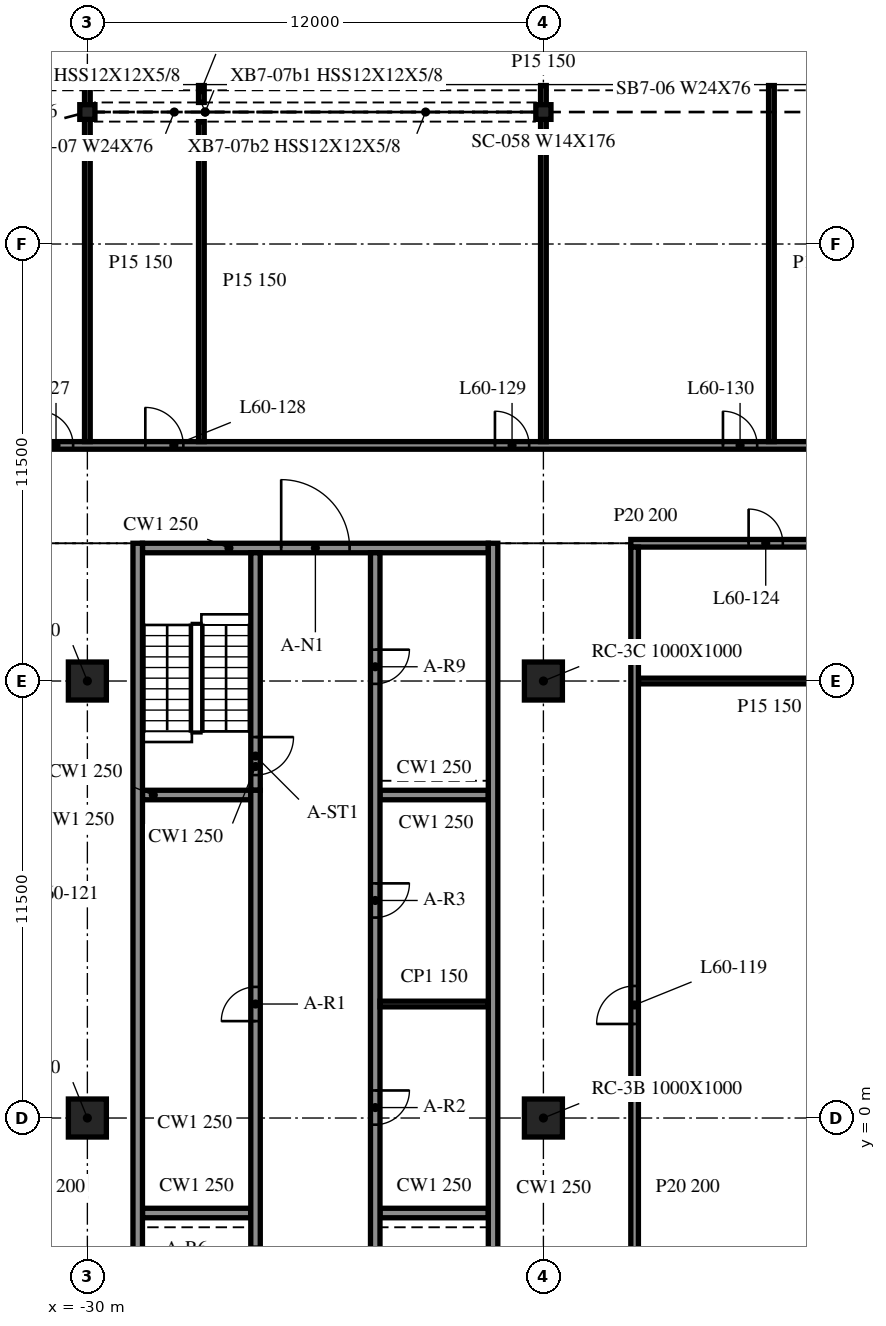
"""IFC4 building model, lengths in metres.
Left out: names, types, materials, properties, quantities, classifications, styles, units other than length and angle.
Written with IfcOpenShell. Run it as: python <this file> out.ifc"""

import sys

from ifc_helpers import new_model, si_unit, direction, frame, frame_2d, origin, origin_2d, place, context, subcontext, project, spatial, rectangle, i_section, extrude, element, fill, save


model = new_model("IFC4")
c1 = context("Model", 3, precision=1e-05, world=origin(), true_north=direction((0.0, 1.0)))
c2 = subcontext(c1, "Body", "Model", "MODEL_VIEW")
j1 = project(units=[si_unit("LENGTHUNIT", "METRE"), si_unit("PLANEANGLEUNIT", "RADIAN")], contexts=[c1])
p1 = place(None, origin())
s1 = spatial("IfcSite", under=j1, at=p1, CompositionType="ELEMENT")
p2 = place(p1, origin())
s2 = spatial("IfcBuilding", under=s1, at=p2, CompositionType="ELEMENT")
p3 = place(p2, frame((0.0, 0.0, 247.6)))
s3 = spatial("IfcBuildingStorey", under=s2, at=p3, CompositionType="ELEMENT", Elevation=247.6)
for number, where, z_axis, x_axis in (
    (1, (-30.0, 0.0, -0.34), (0.0, 0.0, 1.0), (1.0, 0.0, 0.0)),
    (2, (-30.0, 11.5, -0.34), (0.0, 0.0, 1.0), (1.0, 0.0, 0.0)),
    (3, (-18.0, 0.0, -0.34), (0.0, 0.0, 1.0), (1.0, 0.0, 0.0)),
    (4, (-18.0, 11.5, -0.34), (0.0, 0.0, 1.0), (1.0, 0.0, 0.0)),
):
    element("IfcColumn", number, at=place(p3, frame(where, z_axis=z_axis, x_axis=x_axis)), inside=s3, PredefinedType="COLUMN", context=c2, shape_type="SweptSolid", body=[
        extrude(rectangle(XDim=1.0, YDim=1.0, at=origin_2d()), origin(), (0.0, 0.0, 1.0), 3.8),
    ])
for number, where, z_axis, x_axis in (
    (5, (-18.0, 26.473, -0.34), (0.0, 0.0, 1.0), (1.0, 0.0, 0.0)),
    (6, (-30.0, 26.473, -0.34), (0.0, 0.0, 1.0), (1.0, 0.0, 0.0)),
):
    element("IfcColumn", number, at=place(p3, frame(where, z_axis=z_axis, x_axis=x_axis)), inside=s3, PredefinedType="COLUMN", context=c2, shape_type="SweptSolid", body=[
        extrude(i_section(OverallWidth=0.399, OverallDepth=0.386, WebThickness=0.021, FlangeThickness=0.033, at=origin_2d()), origin(), (0.0, 0.0, 1.0), 3.8),
    ])
for number, where, z_axis, x_axis in (
    (7, (-28.675, 15.125, 0.0), (0.0, 0.0, 1.0), (0.0, -1.0, 0.0)),
    (8, (-19.325, -9.125, 0.0), (0.0, 0.0, 1.0), (0.0, 1.0, 0.0)),
):
    element("IfcWall", number, at=place(p3, frame(where, z_axis=z_axis, x_axis=x_axis)), inside=s3, PredefinedType="SOLIDWALL", context=c2, shape_type="SweptSolid", body=[
        extrude(rectangle(XDim=24.25, YDim=0.25, at=frame_2d((12.125, 0.0))), origin(), (0.0, 0.0, 1.0), 3.46),
    ])
p4 = place(p3, frame((-28.55, 15.0, 0.0), z_axis=(0.0, 0.0, 1.0), x_axis=(1.0, 0.0, 0.0)))
e9 = element("IfcWall", 9, at=p4, inside=s3, PredefinedType="SOLIDWALL", context=c2, shape_type="SweptSolid", body=[
    extrude(rectangle(XDim=9.1, YDim=0.25, at=frame_2d((4.55, 0.0))), origin(), (0.0, 0.0, 1.0), 3.46),
])
p5 = place(p4, frame((3.65, 0.0, 0.0)))
e10 = element("IfcOpeningElement", 10, at=p5, cuts=e9, PredefinedType="OPENING", context=c2, shape_type="SweptSolid", body=[
    extrude(rectangle(XDim=1.8, YDim=2.1, at=frame_2d((0.9, 1.05))), frame((0.0, 0.135, 0.0), z_axis=(0.0, -1.0, 0.0), x_axis=(1.0, 0.0, 0.0)), (0.0, 0.0, 1.0), 0.27),
])
p6 = place(p3, frame((-25.575, -8.875, 0.0), z_axis=(0.0, 0.0, 1.0), x_axis=(0.0, 1.0, 0.0)))
e11 = element("IfcWall", 11, at=p6, inside=s3, PredefinedType="SOLIDWALL", context=c2, shape_type="SweptSolid", body=[
    extrude(rectangle(XDim=17.5, YDim=0.25, at=frame_2d((8.75, 0.0))), origin(), (0.0, 0.0, 1.0), 3.46),
])
p7 = place(p6, frame((11.425, 0.0, 0.0)))
e12 = element("IfcOpeningElement", 12, at=p7, cuts=e11, PredefinedType="OPENING", context=c2, shape_type="SweptSolid", body=[
    extrude(rectangle(XDim=0.9, YDim=2.1, at=frame_2d((0.45, 1.05))), frame((0.0, 0.135, 0.0), z_axis=(0.0, -1.0, 0.0), x_axis=(1.0, 0.0, 0.0)), (0.0, 0.0, 1.0), 0.27),
])
p8 = place(p6, frame((0.512, 0.0, 0.0)))
e13 = element("IfcOpeningElement", 13, at=p8, cuts=e11, PredefinedType="OPENING", context=c2, shape_type="SweptSolid", body=[
    extrude(rectangle(XDim=0.9, YDim=2.1, at=frame_2d((0.45, 1.05))), frame((0.0, 0.135, 0.0), z_axis=(0.0, -1.0, 0.0), x_axis=(1.0, 0.0, 0.0)), (0.0, 0.0, 1.0), 0.27),
])
p9 = place(p6, frame((2.55, 0.0, 0.0)))
e14 = element("IfcOpeningElement", 14, at=p9, cuts=e11, PredefinedType="OPENING", context=c2, shape_type="SweptSolid", body=[
    extrude(rectangle(XDim=0.9, YDim=2.1, at=frame_2d((0.45, 1.05))), frame((0.0, 0.135, 0.0), z_axis=(0.0, -1.0, 0.0), x_axis=(1.0, 0.0, 0.0)), (0.0, 0.0, 1.0), 0.27),
])
p10 = place(p6, frame((4.587, 0.0, 0.0)))
e15 = element("IfcOpeningElement", 15, at=p10, cuts=e11, PredefinedType="OPENING", context=c2, shape_type="SweptSolid", body=[
    extrude(rectangle(XDim=0.9, YDim=2.1, at=frame_2d((0.45, 1.05))), frame((0.0, 0.135, 0.0), z_axis=(0.0, -1.0, 0.0), x_axis=(1.0, 0.0, 0.0)), (0.0, 0.0, 1.0), 0.27),
])
p11 = place(p3, frame((-25.575, 14.875, 0.0), z_axis=(0.0, 0.0, 1.0), x_axis=(0.0, -1.0, 0.0)))
e16 = element("IfcWall", 16, at=p11, inside=s3, PredefinedType="SOLIDWALL", context=c2, shape_type="SweptSolid", body=[
    extrude(rectangle(XDim=6.25, YDim=0.25, at=frame_2d((3.125, 0.0))), origin(), (0.0, 0.0, 1.0), 3.46),
])
p12 = place(p11, frame((4.85, 0.0, 0.0)))
e17 = element("IfcOpeningElement", 17, at=p12, cuts=e16, PredefinedType="OPENING", context=c2, shape_type="SweptSolid", body=[
    extrude(rectangle(XDim=1.0, YDim=2.1, at=frame_2d((0.5, 1.05))), frame((0.0, 0.135, 0.0), z_axis=(0.0, -1.0, 0.0), x_axis=(1.0, 0.0, 0.0)), (0.0, 0.0, 1.0), 0.27),
])
p13 = place(p3, frame((-22.425, 14.875, 0.0), z_axis=(0.0, 0.0, 1.0), x_axis=(0.0, -1.0, 0.0)))
e18 = element("IfcWall", 18, at=p13, inside=s3, PredefinedType="SOLIDWALL", context=c2, shape_type="SweptSolid", body=[
    extrude(rectangle(XDim=23.75, YDim=0.25, at=frame_2d((11.875, 0.0))), origin(), (0.0, 0.0, 1.0), 3.46),
])
p14 = place(p13, frame((14.15, 0.0, 0.0)))
e19 = element("IfcOpeningElement", 19, at=p14, cuts=e18, PredefinedType="OPENING", context=c2, shape_type="SweptSolid", body=[
    extrude(rectangle(XDim=0.9, YDim=2.1, at=frame_2d((0.45, 1.05))), frame((0.0, 0.135, 0.0), z_axis=(0.0, -1.0, 0.0), x_axis=(1.0, 0.0, 0.0)), (0.0, 0.0, 1.0), 0.27),
])
p15 = place(p13, frame((8.7, 0.0, 0.0)))
e20 = element("IfcOpeningElement", 20, at=p15, cuts=e18, PredefinedType="OPENING", context=c2, shape_type="SweptSolid", body=[
    extrude(rectangle(XDim=0.9, YDim=2.1, at=frame_2d((0.45, 1.05))), frame((0.0, 0.135, 0.0), z_axis=(0.0, -1.0, 0.0), x_axis=(1.0, 0.0, 0.0)), (0.0, 0.0, 1.0), 0.27),
])
p16 = place(p13, frame((22.137, 0.0, 0.0)))
e21 = element("IfcOpeningElement", 21, at=p16, cuts=e18, PredefinedType="OPENING", context=c2, shape_type="SweptSolid", body=[
    extrude(rectangle(XDim=0.9, YDim=2.1, at=frame_2d((0.45, 1.05))), frame((0.0, 0.135, 0.0), z_axis=(0.0, -1.0, 0.0), x_axis=(1.0, 0.0, 0.0)), (0.0, 0.0, 1.0), 0.27),
])
p17 = place(p13, frame((19.062, 0.0, 0.0)))
e22 = element("IfcOpeningElement", 22, at=p17, cuts=e18, PredefinedType="OPENING", context=c2, shape_type="SweptSolid", body=[
    extrude(rectangle(XDim=0.9, YDim=2.1, at=frame_2d((0.45, 1.05))), frame((0.0, 0.135, 0.0), z_axis=(0.0, -1.0, 0.0), x_axis=(1.0, 0.0, 0.0)), (0.0, 0.0, 1.0), 0.27),
])
p18 = place(p13, frame((2.55, 0.0, 0.0)))
e23 = element("IfcOpeningElement", 23, at=p18, cuts=e18, PredefinedType="OPENING", context=c2, shape_type="SweptSolid", body=[
    extrude(rectangle(XDim=0.9, YDim=2.1, at=frame_2d((0.45, 1.05))), frame((0.0, 0.135, 0.0), z_axis=(0.0, -1.0, 0.0), x_axis=(1.0, 0.0, 0.0)), (0.0, 0.0, 1.0), 0.27),
])
for number, where, z_axis, x_axis in (
    (24, (-28.55, -2.5, 0.0), (0.0, 0.0, 1.0), (1.0, 0.0, 0.0)),
    (25, (-28.55, 8.5, 0.0), (0.0, 0.0, 1.0), (1.0, 0.0, 0.0)),
    (26, (-22.3, -2.5, 0.0), (0.0, 0.0, 1.0), (1.0, 0.0, 0.0)),
    (27, (-22.3, 8.5, 0.0), (0.0, 0.0, 1.0), (1.0, 0.0, 0.0)),
):
    element("IfcWall", number, at=place(p3, frame(where, z_axis=z_axis, x_axis=x_axis)), inside=s3, PredefinedType="SOLIDWALL", context=c2, shape_type="SweptSolid", body=[
        extrude(rectangle(XDim=2.85, YDim=0.25, at=frame_2d((1.425, 0.0))), origin(), (0.0, 0.0, 1.0), 3.46),
    ])
p19 = place(p3, frame((-22.3, 3.0, 0.0), z_axis=(0.0, 0.0, 1.0), x_axis=(1.0, 0.0, 0.0)))
e28 = element("IfcWall", 28, at=p19, inside=s3, PredefinedType="PARTITIONING", context=c2, shape_type="SweptSolid", body=[
    extrude(rectangle(XDim=2.85, YDim=0.15, at=frame_2d((1.425, 0.0))), origin(), (0.0, 0.0, 1.0), 3.46),
])
p20 = place(p3, frame((-15.5, 11.5, 0.0), z_axis=(0.0, 0.0, 1.0), x_axis=(1.0, 0.0, 0.0)))
e29 = element("IfcWall", 29, at=p20, inside=s3, PredefinedType="PARTITIONING", context=c2, shape_type="SweptSolid", body=[
    extrude(rectangle(XDim=6.9, YDim=0.15, at=frame_2d((3.45, 0.0))), origin(), (0.0, 0.0, 1.0), 3.46),
])
p21 = place(p3, frame((-15.7, 15.125, 0.0), z_axis=(0.0, 0.0, 1.0), x_axis=(1.0, 0.0, 0.0)))
e30 = element("IfcWall", 30, at=p21, inside=s3, PredefinedType="PARTITIONING", context=c2, shape_type="SweptSolid", body=[
    extrude(rectangle(XDim=7.3, YDim=0.2, at=frame_2d((3.65, 0.0))), origin(), (0.0, 0.0, 1.0), 3.46),
])
p22 = place(p21, frame((3.1, 0.0, 0.0)))
e31 = element("IfcOpeningElement", 31, at=p22, cuts=e30, PredefinedType="OPENING", context=c2, shape_type="SweptSolid", body=[
    extrude(rectangle(XDim=0.9, YDim=2.1, at=frame_2d((0.45, 1.05))), frame((0.0, 0.11, 0.0), z_axis=(0.0, -1.0, 0.0), x_axis=(1.0, 0.0, 0.0)), (0.0, 0.0, 1.0), 0.22),
])
p23 = place(p3, frame((-41.975, 17.7, 0.0), z_axis=(0.0, 0.0, 1.0), x_axis=(1.0, 0.0, 0.0)))
e32 = element("IfcWall", 32, at=p23, inside=s3, PredefinedType="PARTITIONING", context=c2, shape_type="SweptSolid", body=[
    extrude(rectangle(XDim=95.95, YDim=0.2, at=frame_2d((47.975, 0.0))), origin(), (0.0, 0.0, 1.0), 3.46),
])
p24 = place(p23, frame((10.7, 0.0, 0.0)))
e33 = element("IfcOpeningElement", 33, at=p24, cuts=e32, PredefinedType="OPENING", context=c2, shape_type="SweptSolid", body=[
    extrude(rectangle(XDim=0.9, YDim=2.1, at=frame_2d((0.45, 1.05))), frame((0.0, 0.11, 0.0), z_axis=(0.0, -1.0, 0.0), x_axis=(1.0, 0.0, 0.0)), (0.0, 0.0, 1.0), 0.22),
])
p25 = place(p23, frame((13.5, 0.0, 0.0)))
e34 = element("IfcOpeningElement", 34, at=p25, cuts=e32, PredefinedType="OPENING", context=c2, shape_type="SweptSolid", body=[
    extrude(rectangle(XDim=1.0, YDim=2.1, at=frame_2d((0.5, 1.05))), frame((0.0, 0.11, 0.0), z_axis=(0.0, -1.0, 0.0), x_axis=(1.0, 0.0, 0.0)), (0.0, 0.0, 1.0), 0.22),
])
p26 = place(p23, frame((22.7, 0.0, 0.0)))
e35 = element("IfcOpeningElement", 35, at=p26, cuts=e32, PredefinedType="OPENING", context=c2, shape_type="SweptSolid", body=[
    extrude(rectangle(XDim=0.9, YDim=2.1, at=frame_2d((0.45, 1.05))), frame((0.0, 0.11, 0.0), z_axis=(0.0, -1.0, 0.0), x_axis=(1.0, 0.0, 0.0)), (0.0, 0.0, 1.0), 0.22),
])
p27 = place(p23, frame((28.7, 0.0, 0.0)))
e36 = element("IfcOpeningElement", 36, at=p27, cuts=e32, PredefinedType="OPENING", context=c2, shape_type="SweptSolid", body=[
    extrude(rectangle(XDim=0.9, YDim=2.1, at=frame_2d((0.45, 1.05))), frame((0.0, 0.11, 0.0), z_axis=(0.0, -1.0, 0.0), x_axis=(1.0, 0.0, 0.0)), (0.0, 0.0, 1.0), 0.22),
])
p28 = place(p23, frame((40.5, 0.0, 0.0)))
e37 = element("IfcOpeningElement", 37, at=p28, cuts=e32, PredefinedType="OPENING", context=c2, shape_type="SweptSolid", body=[
    extrude(rectangle(XDim=1.0, YDim=2.1, at=frame_2d((0.5, 1.05))), frame((0.0, 0.11, 0.0), z_axis=(0.0, -1.0, 0.0), x_axis=(1.0, 0.0, 0.0)), (0.0, 0.0, 1.0), 0.22),
])
p29 = place(p23, frame((43.5, 0.0, 0.0)))
e38 = element("IfcOpeningElement", 38, at=p29, cuts=e32, PredefinedType="OPENING", context=c2, shape_type="SweptSolid", body=[
    extrude(rectangle(XDim=1.0, YDim=2.1, at=frame_2d((0.5, 1.05))), frame((0.0, 0.11, 0.0), z_axis=(0.0, -1.0, 0.0), x_axis=(1.0, 0.0, 0.0)), (0.0, 0.0, 1.0), 0.22),
])
p30 = place(p23, frame((47.3, 0.0, 0.0)))
e39 = element("IfcOpeningElement", 39, at=p30, cuts=e32, PredefinedType="OPENING", context=c2, shape_type="SweptSolid", body=[
    extrude(rectangle(XDim=0.9, YDim=2.1, at=frame_2d((0.45, 1.05))), frame((0.0, 0.11, 0.0), z_axis=(0.0, -1.0, 0.0), x_axis=(1.0, 0.0, 0.0)), (0.0, 0.0, 1.0), 0.22),
])
p31 = place(p23, frame((54.1, 0.0, 0.0)))
e40 = element("IfcOpeningElement", 40, at=p31, cuts=e32, PredefinedType="OPENING", context=c2, shape_type="SweptSolid", body=[
    extrude(rectangle(XDim=1.0, YDim=2.1, at=frame_2d((0.5, 1.05))), frame((0.0, 0.11, 0.0), z_axis=(0.0, -1.0, 0.0), x_axis=(1.0, 0.0, 0.0)), (0.0, 0.0, 1.0), 0.22),
])
p32 = place(p23, frame((60.1, 0.0, 0.0)))
e41 = element("IfcOpeningElement", 41, at=p32, cuts=e32, PredefinedType="OPENING", context=c2, shape_type="SweptSolid", body=[
    extrude(rectangle(XDim=0.9, YDim=2.1, at=frame_2d((0.45, 1.05))), frame((0.0, 0.11, 0.0), z_axis=(0.0, -1.0, 0.0), x_axis=(1.0, 0.0, 0.0)), (0.0, 0.0, 1.0), 0.22),
])
p33 = place(p23, frame((72.1, 0.0, 0.0)))
e42 = element("IfcOpeningElement", 42, at=p33, cuts=e32, PredefinedType="OPENING", context=c2, shape_type="SweptSolid", body=[
    extrude(rectangle(XDim=0.9, YDim=2.1, at=frame_2d((0.45, 1.05))), frame((0.0, 0.11, 0.0), z_axis=(0.0, -1.0, 0.0), x_axis=(1.0, 0.0, 0.0)), (0.0, 0.0, 1.0), 0.22),
])
p34 = place(p23, frame((75.1, 0.0, 0.0)))
e43 = element("IfcOpeningElement", 43, at=p34, cuts=e32, PredefinedType="OPENING", context=c2, shape_type="SweptSolid", body=[
    extrude(rectangle(XDim=1.0, YDim=2.1, at=frame_2d((0.5, 1.05))), frame((0.0, 0.11, 0.0), z_axis=(0.0, -1.0, 0.0), x_axis=(1.0, 0.0, 0.0)), (0.0, 0.0, 1.0), 0.22),
])
p35 = place(p23, frame((84.1, 0.0, 0.0)))
e44 = element("IfcOpeningElement", 44, at=p35, cuts=e32, PredefinedType="OPENING", context=c2, shape_type="SweptSolid", body=[
    extrude(rectangle(XDim=1.0, YDim=2.1, at=frame_2d((0.5, 1.05))), frame((0.0, 0.11, 0.0), z_axis=(0.0, -1.0, 0.0), x_axis=(1.0, 0.0, 0.0)), (0.0, 0.0, 1.0), 0.22),
])
p36 = place(p23, frame((90.1, 0.0, 0.0)))
e45 = element("IfcOpeningElement", 45, at=p36, cuts=e32, PredefinedType="OPENING", context=c2, shape_type="SweptSolid", body=[
    extrude(rectangle(XDim=0.9, YDim=2.1, at=frame_2d((0.45, 1.05))), frame((0.0, 0.11, 0.0), z_axis=(0.0, -1.0, 0.0), x_axis=(1.0, 0.0, 0.0)), (0.0, 0.0, 1.0), 0.22),
])
p37 = place(p3, frame((-30.0, 17.8, 0.0), z_axis=(0.0, 0.0, 1.0), x_axis=(0.0, 1.0, 0.0)))
e46 = element("IfcWall", 46, at=p37, inside=s3, PredefinedType="PARTITIONING", context=c2, shape_type="SweptSolid", body=[
    extrude(rectangle(XDim=9.37, YDim=0.15, at=frame_2d((4.685, 0.0))), origin(), (0.0, 0.0, 1.0), 3.46),
])
p38 = place(p3, frame((-27.0, 17.8, 0.0), z_axis=(0.0, 0.0, 1.0), x_axis=(0.0, 1.0, 0.0)))
e47 = element("IfcWall", 47, at=p38, inside=s3, PredefinedType="PARTITIONING", context=c2, shape_type="SweptSolid", body=[
    extrude(rectangle(XDim=8.421, YDim=0.15, at=frame_2d((4.21, 0.0))), origin(), (0.0, 0.0, 1.0), 3.46),
])
p39 = place(p3, frame((-27.0, 26.725, 0.0), z_axis=(0.0, 0.0, 1.0), x_axis=(0.0, 1.0, 0.0)))
e48 = element("IfcWall", 48, at=p39, inside=s3, PredefinedType="PARTITIONING", context=c2, shape_type="SweptSolid", body=[
    extrude(rectangle(XDim=0.445, YDim=0.15, at=frame_2d((0.222, 0.0))), origin(), (0.0, 0.0, 1.0), 3.46),
])
p40 = place(p3, frame((-18.0, 17.8, 0.0), z_axis=(0.0, 0.0, 1.0), x_axis=(0.0, 1.0, 0.0)))
e49 = element("IfcWall", 49, at=p40, inside=s3, PredefinedType="PARTITIONING", context=c2, shape_type="SweptSolid", body=[
    extrude(rectangle(XDim=9.37, YDim=0.15, at=frame_2d((4.685, 0.0))), origin(), (0.0, 0.0, 1.0), 3.46),
])
p41 = place(p3, frame((-15.6, -9.025, 0.0), z_axis=(0.0, 0.0, 1.0), x_axis=(0.0, 1.0, 0.0)))
e50 = element("IfcWall", 50, at=p41, inside=s3, PredefinedType="PARTITIONING", context=c2, shape_type="SweptSolid", body=[
    extrude(rectangle(XDim=24.05, YDim=0.2, at=frame_2d((12.025, 0.0))), origin(), (0.0, 0.0, 1.0), 3.46),
])
p42 = place(p41, frame((11.5, 0.0, 0.0)))
e51 = element("IfcOpeningElement", 51, at=p42, cuts=e50, PredefinedType="OPENING", context=c2, shape_type="SweptSolid", body=[
    extrude(rectangle(XDim=1.0, YDim=2.1, at=frame_2d((0.5, 1.05))), frame((0.0, 0.11, 0.0), z_axis=(0.0, -1.0, 0.0), x_axis=(1.0, 0.0, 0.0)), (0.0, 0.0, 1.0), 0.22),
])
p43 = place(p3, frame((-12.0, 17.8, 0.0), z_axis=(0.0, 0.0, 1.0), x_axis=(0.0, 1.0, 0.0)))
e52 = element("IfcWall", 52, at=p43, inside=s3, PredefinedType="PARTITIONING", context=c2, shape_type="SweptSolid", body=[
    extrude(rectangle(XDim=9.37, YDim=0.15, at=frame_2d((4.685, 0.0))), origin(), (0.0, 0.0, 1.0), 3.46),
])
p44 = place(p5, origin())
e53 = element("IfcDoor", 53, at=p44, inside=s3, OperationType="DOUBLE_DOOR_SINGLE_SWING", PredefinedType="DOOR", context=c2, shape_type="SweptSolid", body=[
    extrude(rectangle(XDim=1.8, YDim=2.1, at=frame_2d((0.9, 1.05))), frame((0.0, 0.025, 0.0), z_axis=(0.0, -1.0, 0.0), x_axis=(1.0, 0.0, 0.0)), (0.0, 0.0, 1.0), 0.05),
])
fill(e10, e53)
p45 = place(p7, origin())
e54 = element("IfcDoor", 54, at=p45, inside=s3, OperationType="SINGLE_SWING_LEFT", PredefinedType="DOOR", context=c2, shape_type="SweptSolid", body=[
    extrude(rectangle(XDim=0.9, YDim=2.1, at=frame_2d((0.45, 1.05))), frame((0.0, 0.025, 0.0), z_axis=(0.0, -1.0, 0.0), x_axis=(1.0, 0.0, 0.0)), (0.0, 0.0, 1.0), 0.05),
])
fill(e12, e54)
p46 = place(p14, origin())
e55 = element("IfcDoor", 55, at=p46, inside=s3, OperationType="SINGLE_SWING_RIGHT", PredefinedType="DOOR", context=c2, shape_type="SweptSolid", body=[
    extrude(rectangle(XDim=0.9, YDim=2.1, at=frame_2d((0.45, 1.05))), frame((0.0, 0.025, 0.0), z_axis=(0.0, -1.0, 0.0), x_axis=(1.0, 0.0, 0.0)), (0.0, 0.0, 1.0), 0.05),
])
fill(e19, e55)
p47 = place(p15, origin())
e56 = element("IfcDoor", 56, at=p47, inside=s3, OperationType="SINGLE_SWING_LEFT", PredefinedType="DOOR", context=c2, shape_type="SweptSolid", body=[
    extrude(rectangle(XDim=0.9, YDim=2.1, at=frame_2d((0.45, 1.05))), frame((0.0, 0.025, 0.0), z_axis=(0.0, -1.0, 0.0), x_axis=(1.0, 0.0, 0.0)), (0.0, 0.0, 1.0), 0.05),
])
fill(e20, e56)
p48 = place(p18, origin())
e57 = element("IfcDoor", 57, at=p48, inside=s3, OperationType="SINGLE_SWING_LEFT", PredefinedType="DOOR", context=c2, shape_type="SweptSolid", body=[
    extrude(rectangle(XDim=0.9, YDim=2.1, at=frame_2d((0.45, 1.05))), frame((0.0, 0.025, 0.0), z_axis=(0.0, -1.0, 0.0), x_axis=(1.0, 0.0, 0.0)), (0.0, 0.0, 1.0), 0.05),
])
fill(e23, e57)
p49 = place(p12, origin())
e58 = element("IfcDoor", 58, at=p49, inside=s3, OperationType="SINGLE_SWING_RIGHT", PredefinedType="DOOR", context=c2, shape_type="SweptSolid", body=[
    extrude(rectangle(XDim=1.0, YDim=2.1, at=frame_2d((0.5, 1.05))), frame((0.0, 0.025, 0.0), z_axis=(0.0, -1.0, 0.0), x_axis=(1.0, 0.0, 0.0)), (0.0, 0.0, 1.0), 0.05),
])
fill(e17, e58)
p50 = place(p42, origin())
e59 = element("IfcDoor", 59, at=p50, inside=s3, OperationType="SINGLE_SWING_RIGHT", PredefinedType="DOOR", context=c2, shape_type="SweptSolid", body=[
    extrude(rectangle(XDim=1.0, YDim=2.1, at=frame_2d((0.5, 1.05))), frame((0.0, 0.025, 0.0), z_axis=(0.0, -1.0, 0.0), x_axis=(1.0, 0.0, 0.0)), (0.0, 0.0, 1.0), 0.05),
])
fill(e51, e59)
p51 = place(p22, origin())
e60 = element("IfcDoor", 60, at=p51, inside=s3, OperationType="SINGLE_SWING_RIGHT", PredefinedType="DOOR", context=c2, shape_type="SweptSolid", body=[
    extrude(rectangle(XDim=0.9, YDim=2.1, at=frame_2d((0.45, 1.05))), frame((0.0, 0.025, 0.0), z_axis=(0.0, -1.0, 0.0), x_axis=(1.0, 0.0, 0.0)), (0.0, 0.0, 1.0), 0.05),
])
fill(e31, e60)
p52 = place(p24, origin())
e61 = element("IfcDoor", 61, at=p52, inside=s3, OperationType="SINGLE_SWING_LEFT", PredefinedType="DOOR", context=c2, shape_type="SweptSolid", body=[
    extrude(rectangle(XDim=0.9, YDim=2.1, at=frame_2d((0.45, 1.05))), frame((0.0, 0.025, 0.0), z_axis=(0.0, -1.0, 0.0), x_axis=(1.0, 0.0, 0.0)), (0.0, 0.0, 1.0), 0.05),
])
fill(e33, e61)
p53 = place(p25, origin())
e62 = element("IfcDoor", 62, at=p53, inside=s3, OperationType="SINGLE_SWING_LEFT", PredefinedType="DOOR", context=c2, shape_type="SweptSolid", body=[
    extrude(rectangle(XDim=1.0, YDim=2.1, at=frame_2d((0.5, 1.05))), frame((0.0, 0.025, 0.0), z_axis=(0.0, -1.0, 0.0), x_axis=(1.0, 0.0, 0.0)), (0.0, 0.0, 1.0), 0.05),
])
fill(e34, e62)
p54 = place(p26, origin())
e63 = element("IfcDoor", 63, at=p54, inside=s3, OperationType="SINGLE_SWING_LEFT", PredefinedType="DOOR", context=c2, shape_type="SweptSolid", body=[
    extrude(rectangle(XDim=0.9, YDim=2.1, at=frame_2d((0.45, 1.05))), frame((0.0, 0.025, 0.0), z_axis=(0.0, -1.0, 0.0), x_axis=(1.0, 0.0, 0.0)), (0.0, 0.0, 1.0), 0.05),
])
fill(e35, e63)
p55 = place(p27, origin())
e64 = element("IfcDoor", 64, at=p55, inside=s3, OperationType="SINGLE_SWING_LEFT", PredefinedType="DOOR", context=c2, shape_type="SweptSolid", body=[
    extrude(rectangle(XDim=0.9, YDim=2.1, at=frame_2d((0.45, 1.05))), frame((0.0, 0.025, 0.0), z_axis=(0.0, -1.0, 0.0), x_axis=(1.0, 0.0, 0.0)), (0.0, 0.0, 1.0), 0.05),
])
fill(e36, e64)
save(model, sys.argv[1])
